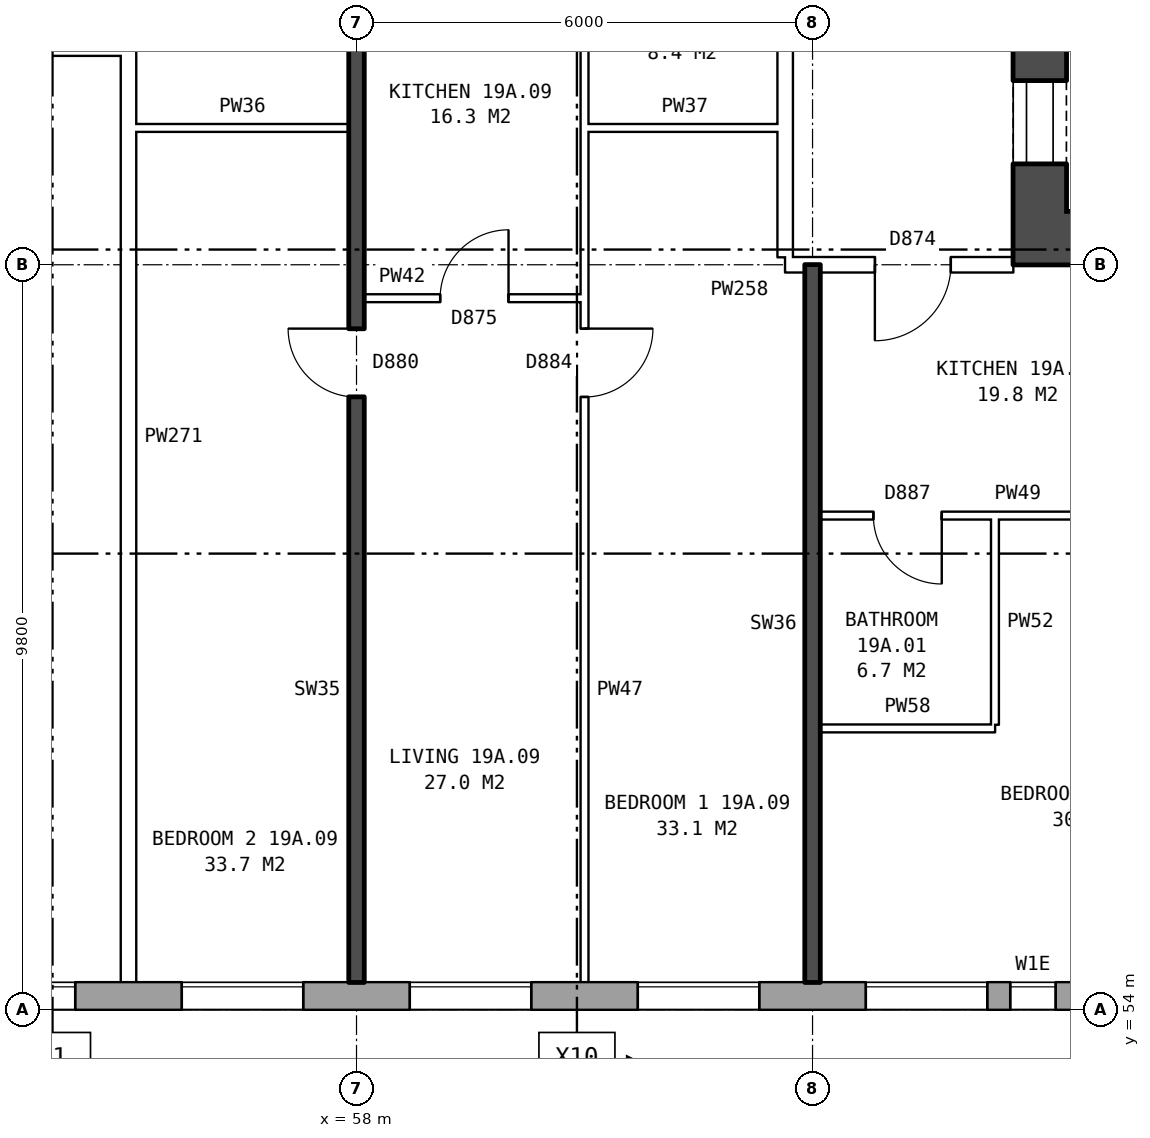
"""IFC4 building model, lengths in metres.
Left out: names, types, materials, properties, quantities, classifications, styles, units other than length and angle.
Written with IfcOpenShell. Run it as: python <this file> out.ifc"""

import sys

from ifc_helpers import new_model, si_unit, direction, frame, frame_2d, origin, place, context, subcontext, project, spatial, rectangle, extrude, element, fill, save


model = new_model("IFC4")
c1 = context("Model", 3, precision=1e-05, world=origin(), true_north=direction((0.0, 1.0)))
c2 = subcontext(c1, "Body", "Model", "MODEL_VIEW")
j1 = project(units=[si_unit("LENGTHUNIT", "METRE"), si_unit("PLANEANGLEUNIT", "RADIAN")], contexts=[c1])
p1 = place(None, origin())
s1 = spatial("IfcSite", under=j1, at=p1, CompositionType="ELEMENT")
p2 = place(p1, origin())
s2 = spatial("IfcBuilding", under=s1, at=p2, CompositionType="ELEMENT")
p3 = place(p2, frame((0.0, 0.0, 71.6)))
s3 = spatial("IfcBuildingStorey", under=s2, at=p3, CompositionType="ELEMENT", Elevation=71.6)
p4 = place(p3, frame((26.325, 54.18, 0.0), z_axis=(0.0, 0.0, 1.0), x_axis=(1.0, 0.0, 0.0)))
e1 = element("IfcWall", 1, at=p4, inside=s3, PredefinedType="STANDARD", context=c2, shape_type="SweptSolid", body=[
    extrude(rectangle(XDim=46.601, YDim=0.36, at=frame_2d((23.3, 0.0))), origin(), (0.0, 0.0, 1.0), 2.85),
])
p5 = place(p4, frame((1.875, 0.0, 1.0)))
e2 = element("IfcOpeningElement", 2, at=p5, cuts=e1, PredefinedType="OPENING", context=c2, shape_type="SweptSolid", body=[
    extrude(rectangle(XDim=0.6, YDim=1.5, at=frame_2d((0.3, 0.75))), frame((0.0, 0.19, 0.0), z_axis=(0.0, -1.0, 0.0), x_axis=(1.0, 0.0, 0.0)), (0.0, 0.0, 1.0), 0.38),
])
p6 = place(p4, frame((5.375, 0.0, 0.8)))
e3 = element("IfcOpeningElement", 3, at=p6, cuts=e1, PredefinedType="OPENING", context=c2, shape_type="SweptSolid", body=[
    extrude(rectangle(XDim=1.6, YDim=1.8, at=frame_2d((0.8, 0.9))), frame((0.0, 0.19, 0.0), z_axis=(0.0, -1.0, 0.0), x_axis=(1.0, 0.0, 0.0)), (0.0, 0.0, 1.0), 0.38),
])
p7 = place(p4, frame((8.375, 0.0, 0.8)))
e4 = element("IfcOpeningElement", 4, at=p7, cuts=e1, PredefinedType="OPENING", context=c2, shape_type="SweptSolid", body=[
    extrude(rectangle(XDim=1.6, YDim=1.8, at=frame_2d((0.8, 0.9))), frame((0.0, 0.19, 0.0), z_axis=(0.0, -1.0, 0.0), x_axis=(1.0, 0.0, 0.0)), (0.0, 0.0, 1.0), 0.38),
])
p8 = place(p4, frame((11.375, 0.0, 0.8)))
e5 = element("IfcOpeningElement", 5, at=p8, cuts=e1, PredefinedType="OPENING", context=c2, shape_type="SweptSolid", body=[
    extrude(rectangle(XDim=1.6, YDim=1.8, at=frame_2d((0.8, 0.9))), frame((0.0, 0.19, 0.0), z_axis=(0.0, -1.0, 0.0), x_axis=(1.0, 0.0, 0.0)), (0.0, 0.0, 1.0), 0.38),
])
p9 = place(p4, frame((14.375, 0.0, 0.8)))
e6 = element("IfcOpeningElement", 6, at=p9, cuts=e1, PredefinedType="OPENING", context=c2, shape_type="SweptSolid", body=[
    extrude(rectangle(XDim=1.6, YDim=1.8, at=frame_2d((0.8, 0.9))), frame((0.0, 0.19, 0.0), z_axis=(0.0, -1.0, 0.0), x_axis=(1.0, 0.0, 0.0)), (0.0, 0.0, 1.0), 0.38),
])
p10 = place(p4, frame((17.375, 0.0, 0.8)))
e7 = element("IfcOpeningElement", 7, at=p10, cuts=e1, PredefinedType="OPENING", context=c2, shape_type="SweptSolid", body=[
    extrude(rectangle(XDim=1.6, YDim=1.8, at=frame_2d((0.8, 0.9))), frame((0.0, 0.19, 0.0), z_axis=(0.0, -1.0, 0.0), x_axis=(1.0, 0.0, 0.0)), (0.0, 0.0, 1.0), 0.38),
])
p11 = place(p4, frame((20.375, 0.0, 0.8)))
e8 = element("IfcOpeningElement", 8, at=p11, cuts=e1, PredefinedType="OPENING", context=c2, shape_type="SweptSolid", body=[
    extrude(rectangle(XDim=1.6, YDim=1.8, at=frame_2d((0.8, 0.9))), frame((0.0, 0.19, 0.0), z_axis=(0.0, -1.0, 0.0), x_axis=(1.0, 0.0, 0.0)), (0.0, 0.0, 1.0), 0.38),
])
p12 = place(p4, frame((23.375, 0.0, 0.8)))
e9 = element("IfcOpeningElement", 9, at=p12, cuts=e1, PredefinedType="OPENING", context=c2, shape_type="SweptSolid", body=[
    extrude(rectangle(XDim=1.6, YDim=1.8, at=frame_2d((0.8, 0.9))), frame((0.0, 0.19, 0.0), z_axis=(0.0, -1.0, 0.0), x_axis=(1.0, 0.0, 0.0)), (0.0, 0.0, 1.0), 0.38),
])
p13 = place(p4, frame((26.375, 0.0, 0.8)))
e10 = element("IfcOpeningElement", 10, at=p13, cuts=e1, PredefinedType="OPENING", context=c2, shape_type="SweptSolid", body=[
    extrude(rectangle(XDim=1.6, YDim=1.8, at=frame_2d((0.8, 0.9))), frame((0.0, 0.19, 0.0), z_axis=(0.0, -1.0, 0.0), x_axis=(1.0, 0.0, 0.0)), (0.0, 0.0, 1.0), 0.38),
])
p14 = place(p4, frame((29.375, 0.0, 0.8)))
e11 = element("IfcOpeningElement", 11, at=p14, cuts=e1, PredefinedType="OPENING", context=c2, shape_type="SweptSolid", body=[
    extrude(rectangle(XDim=1.6, YDim=1.8, at=frame_2d((0.8, 0.9))), frame((0.0, 0.19, 0.0), z_axis=(0.0, -1.0, 0.0), x_axis=(1.0, 0.0, 0.0)), (0.0, 0.0, 1.0), 0.38),
])
p15 = place(p4, frame((32.375, 0.0, 0.8)))
e12 = element("IfcOpeningElement", 12, at=p15, cuts=e1, PredefinedType="OPENING", context=c2, shape_type="SweptSolid", body=[
    extrude(rectangle(XDim=1.6, YDim=1.8, at=frame_2d((0.8, 0.9))), frame((0.0, 0.19, 0.0), z_axis=(0.0, -1.0, 0.0), x_axis=(1.0, 0.0, 0.0)), (0.0, 0.0, 1.0), 0.38),
])
p16 = place(p4, frame((35.375, 0.0, 0.8)))
e13 = element("IfcOpeningElement", 13, at=p16, cuts=e1, PredefinedType="OPENING", context=c2, shape_type="SweptSolid", body=[
    extrude(rectangle(XDim=1.6, YDim=1.8, at=frame_2d((0.8, 0.9))), frame((0.0, 0.19, 0.0), z_axis=(0.0, -1.0, 0.0), x_axis=(1.0, 0.0, 0.0)), (0.0, 0.0, 1.0), 0.38),
])
p17 = place(p4, frame((38.375, 0.0, 0.8)))
e14 = element("IfcOpeningElement", 14, at=p17, cuts=e1, PredefinedType="OPENING", context=c2, shape_type="SweptSolid", body=[
    extrude(rectangle(XDim=1.6, YDim=1.8, at=frame_2d((0.8, 0.9))), frame((0.0, 0.19, 0.0), z_axis=(0.0, -1.0, 0.0), x_axis=(1.0, 0.0, 0.0)), (0.0, 0.0, 1.0), 0.38),
])
p18 = place(p4, frame((40.275, 0.0, 0.8)))
e15 = element("IfcOpeningElement", 15, at=p18, cuts=e1, PredefinedType="OPENING", context=c2, shape_type="SweptSolid", body=[
    extrude(rectangle(XDim=0.6, YDim=1.8, at=frame_2d((0.3, 0.9))), frame((0.0, 0.19, 0.0), z_axis=(0.0, -1.0, 0.0), x_axis=(1.0, 0.0, 0.0)), (0.0, 0.0, 1.0), 0.38),
])
p19 = place(p4, frame((44.375, 0.0, 0.8)))
e16 = element("IfcOpeningElement", 16, at=p19, cuts=e1, PredefinedType="OPENING", context=c2, shape_type="SweptSolid", body=[
    extrude(rectangle(XDim=1.6, YDim=1.8, at=frame_2d((0.8, 0.9))), frame((0.0, 0.19, 0.0), z_axis=(0.0, -1.0, 0.0), x_axis=(1.0, 0.0, 0.0)), (0.0, 0.0, 1.0), 0.38),
])
p20 = place(p4, frame((2.775, 0.0, 1.7)))
e17 = element("IfcOpeningElement", 17, at=p20, cuts=e1, PredefinedType="OPENING", context=c2, shape_type="SweptSolid", body=[
    extrude(rectangle(XDim=0.6, YDim=0.9, at=frame_2d((0.3, 0.45))), frame((0.0, 0.19, 0.0), z_axis=(0.0, -1.0, 0.0), x_axis=(1.0, 0.0, 0.0)), (0.0, 0.0, 1.0), 0.38),
])
p21 = place(p4, frame((41.175, 0.0, 0.8)))
e18 = element("IfcOpeningElement", 18, at=p21, cuts=e1, PredefinedType="OPENING", context=c2, shape_type="SweptSolid", body=[
    extrude(rectangle(XDim=0.8, YDim=0.9, at=frame_2d((0.4, 0.45))), frame((0.0, 0.19, 0.0), z_axis=(0.0, -1.0, 0.0), x_axis=(1.0, 0.0, 0.0)), (0.0, 0.0, 1.0), 0.38),
])
p22 = place(p3, frame((66.99, 64.5, 0.0), z_axis=(0.0, 0.0, 1.0), x_axis=(0.0, 1.0, 0.0)))
e19 = element("IfcWall", 19, at=p22, inside=s3, PredefinedType="SHEAR", context=c2, shape_type="SweptSolid", body=[
    extrude(rectangle(XDim=11.0, YDim=0.7, at=frame_2d((5.5, 0.0))), origin(), (0.0, 0.0, 1.0), 2.85),
])
p23 = place(p22, frame((0.625, 0.0, 0.0)))
e20 = element("IfcOpeningElement", 20, at=p23, cuts=e19, PredefinedType="OPENING", context=c2, shape_type="SweptSolid", body=[
    extrude(rectangle(XDim=1.1, YDim=2.1, at=frame_2d((0.55, 1.05))), frame((0.0, 0.36, 0.0), z_axis=(0.0, -1.0, 0.0), x_axis=(1.0, 0.0, 0.0)), (0.0, 0.0, 1.0), 0.72),
])
p24 = place(p22, frame((9.2, 0.0, 0.0)))
e21 = element("IfcOpeningElement", 21, at=p24, cuts=e19, PredefinedType="OPENING", context=c2, shape_type="SweptSolid", body=[
    extrude(rectangle(XDim=1.1, YDim=2.1, at=frame_2d((0.55, 1.05))), frame((0.0, 0.36, 0.0), z_axis=(0.0, -1.0, 0.0), x_axis=(1.0, 0.0, 0.0)), (0.0, 0.0, 1.0), 0.72),
])
p25 = place(p3, frame((66.64, 64.15, 0.0), z_axis=(0.0, 0.0, 1.0), x_axis=(1.0, 0.0, 0.0)))
e22 = element("IfcWall", 22, at=p25, inside=s3, PredefinedType="SHEAR", context=c2, shape_type="SweptSolid", body=[
    extrude(rectangle(XDim=9.0, YDim=0.7, at=frame_2d((4.5, 0.0))), origin(), (0.0, 0.0, 1.0), 2.85),
])
p26 = place(p3, frame((63.64, 63.9, 0.0), z_axis=(0.0, 0.0, 1.0), x_axis=(0.0, 1.0, 0.0)))
e23 = element("IfcWall", 23, at=p26, inside=s3, PredefinedType="PARTITIONING", context=c2, shape_type="SweptSolid", body=[
    extrude(rectangle(XDim=12.2, YDim=0.2, at=frame_2d((6.1, 0.0))), origin(), (0.0, 0.0, 1.0), 2.85),
])
p27 = place(p26, frame((5.1, 0.0, 0.0)))
e24 = element("IfcOpeningElement", 24, at=p27, cuts=e23, PredefinedType="OPENING", context=c2, shape_type="SweptSolid", body=[
    extrude(rectangle(XDim=2.0, YDim=2.1, at=frame_2d((1.0, 1.05))), frame((0.0, 0.11, 0.0), z_axis=(0.0, -1.0, 0.0), x_axis=(1.0, 0.0, 0.0)), (0.0, 0.0, 1.0), 0.22),
])
p28 = place(p3, frame((64.1, 57.7, 0.0), z_axis=(0.0, 0.0, 1.0), x_axis=(1.0, 0.0, 0.0)))
e25 = element("IfcWall", 25, at=p28, inside=s3, PredefinedType="PARTITIONING", context=c2, shape_type="SweptSolid", body=[
    extrude(rectangle(XDim=2.3, YDim=0.1, at=frame_2d((1.15, 0.0))), origin(), (0.0, 0.0, 1.0), 2.85),
])
p29 = place(p3, frame((64.1, 60.5, 0.0), z_axis=(0.0, 0.0, 1.0), x_axis=(1.0, 0.0, 0.0)))
e26 = element("IfcWall", 26, at=p29, inside=s3, PredefinedType="PARTITIONING", context=c2, shape_type="SweptSolid", body=[
    extrude(rectangle(XDim=5.8, YDim=0.1, at=frame_2d((2.9, 0.0))), origin(), (0.0, 0.0, 1.0), 2.85),
])
p30 = place(p29, frame((3.6, 0.0, 0.0)))
e27 = element("IfcOpeningElement", 27, at=p30, cuts=e26, PredefinedType="OPENING", context=c2, shape_type="SweptSolid", body=[
    extrude(rectangle(XDim=0.9, YDim=2.1, at=frame_2d((0.45, 1.05))), frame((0.0, 0.06, 0.0), z_axis=(0.0, -1.0, 0.0), x_axis=(1.0, 0.0, 0.0)), (0.0, 0.0, 1.0), 0.12),
])
p31 = place(p29, frame((0.7, 0.0, 0.0)))
e28 = element("IfcOpeningElement", 28, at=p31, cuts=e26, PredefinedType="OPENING", context=c2, shape_type="SweptSolid", body=[
    extrude(rectangle(XDim=0.9, YDim=2.1, at=frame_2d((0.45, 1.05))), frame((0.0, 0.06, 0.0), z_axis=(0.0, -1.0, 0.0), x_axis=(1.0, 0.0, 0.0)), (0.0, 0.0, 1.0), 0.12),
])
p32 = place(p3, frame((58.1, 63.36, 0.0), z_axis=(0.0, 0.0, 1.0), x_axis=(1.0, 0.0, 0.0)))
e29 = element("IfcWall", 29, at=p32, inside=s3, PredefinedType="PARTITIONING", context=c2, shape_type="SweptSolid", body=[
    extrude(rectangle(XDim=2.9, YDim=0.1, at=frame_2d((1.45, 0.0))), origin(), (0.0, 0.0, 1.0), 2.85),
])
p33 = place(p32, frame((1.0, 0.0, 0.0)))
e30 = element("IfcOpeningElement", 30, at=p33, cuts=e29, PredefinedType="OPENING", context=c2, shape_type="SweptSolid", body=[
    extrude(rectangle(XDim=0.9, YDim=2.1, at=frame_2d((0.45, 1.05))), frame((0.0, 0.06, 0.0), z_axis=(0.0, -1.0, 0.0), x_axis=(1.0, 0.0, 0.0)), (0.0, 0.0, 1.0), 0.12),
])
p34 = place(p3, frame((63.64, 63.8, 0.0), z_axis=(0.0, 0.0, 1.0), x_axis=(1.0, 0.0, 0.0)))
e31 = element("IfcWall", 31, at=p34, inside=s3, PredefinedType="PARTITIONING", context=c2, shape_type="SweptSolid", body=[
    extrude(rectangle(XDim=3.0, YDim=0.2, at=frame_2d((1.5, 0.0))), origin(), (0.0, 0.0, 1.0), 2.85),
])
p35 = place(p34, frame((1.18, 0.0, 0.0)))
e32 = element("IfcOpeningElement", 32, at=p35, cuts=e31, PredefinedType="OPENING", context=c2, shape_type="SweptSolid", body=[
    extrude(rectangle(XDim=1.0, YDim=2.1, at=frame_2d((0.5, 1.05))), frame((0.0, 0.11, 0.0), z_axis=(0.0, -1.0, 0.0), x_axis=(1.0, 0.0, 0.0)), (0.0, 0.0, 1.0), 0.22),
])
p36 = place(p3, frame((55.1, 65.6, 0.0), z_axis=(0.0, 0.0, 1.0), x_axis=(1.0, 0.0, 0.0)))
e33 = element("IfcWall", 33, at=p36, inside=s3, PredefinedType="PARTITIONING", context=c2, shape_type="SweptSolid", body=[
    extrude(rectangle(XDim=2.8, YDim=0.1, at=frame_2d((1.4, 0.0))), origin(), (0.0, 0.0, 1.0), 2.85),
])
p37 = place(p3, frame((61.0, 65.6, 0.0), z_axis=(0.0, 0.0, 1.0), x_axis=(1.0, 0.0, 0.0)))
e34 = element("IfcWall", 34, at=p37, inside=s3, PredefinedType="PARTITIONING", context=c2, shape_type="SweptSolid", body=[
    extrude(rectangle(XDim=2.64, YDim=0.1, at=frame_2d((1.32, 0.0))), origin(), (0.0, 0.0, 1.0), 2.85),
])
p38 = place(p3, frame((52.1, 66.6, 0.0), z_axis=(0.0, 0.0, 1.0), x_axis=(1.0, 0.0, 0.0)))
e35 = element("IfcWall", 35, at=p38, inside=s3, PredefinedType="PARTITIONING", context=c2, shape_type="SweptSolid", body=[
    extrude(rectangle(XDim=2.8, YDim=0.1, at=frame_2d((1.4, 0.0))), origin(), (0.0, 0.0, 1.0), 2.85),
])
p39 = place(p3, frame((55.0, 54.36, 0.0), z_axis=(0.0, 0.0, 1.0), x_axis=(0.0, 1.0, 0.0)))
e36 = element("IfcWall", 36, at=p39, inside=s3, PredefinedType="PARTITIONING", context=c2, shape_type="SweptSolid", body=[
    extrude(rectangle(XDim=14.34, YDim=0.2, at=frame_2d((7.17, 0.0))), origin(), (0.0, 0.0, 1.0), 2.85),
])
p40 = place(p3, frame((58.0, 54.36, 0.0), z_axis=(0.0, 0.0, 1.0), x_axis=(0.0, 1.0, 0.0)))
e37 = element("IfcWall", 37, at=p40, inside=s3, PredefinedType="SOLIDWALL", context=c2, shape_type="SweptSolid", body=[
    extrude(rectangle(XDim=14.44, YDim=0.2, at=frame_2d((7.22, 0.0))), origin(), (0.0, 0.0, 1.0), 2.85),
])
p41 = place(p40, frame((7.7, 0.0, 0.0)))
e38 = element("IfcOpeningElement", 38, at=p41, cuts=e37, PredefinedType="OPENING", context=c2, shape_type="SweptSolid", body=[
    extrude(rectangle(XDim=0.9, YDim=2.1, at=frame_2d((0.45, 1.05))), frame((0.0, 0.11, 0.0), z_axis=(0.0, -1.0, 0.0), x_axis=(1.0, 0.0, 0.0)), (0.0, 0.0, 1.0), 0.22),
])
p42 = place(p40, frame((13.14, 0.0, 0.0)))
e39 = element("IfcOpeningElement", 39, at=p42, cuts=e37, PredefinedType="OPENING", context=c2, shape_type="SweptSolid", body=[
    extrude(rectangle(XDim=0.9, YDim=2.1, at=frame_2d((0.45, 1.05))), frame((0.0, 0.11, 0.0), z_axis=(0.0, -1.0, 0.0), x_axis=(1.0, 0.0, 0.0)), (0.0, 0.0, 1.0), 0.22),
])
p43 = place(p3, frame((61.0, 54.36, 0.0), z_axis=(0.0, 0.0, 1.0), x_axis=(0.0, 1.0, 0.0)))
e40 = element("IfcWall", 40, at=p43, inside=s3, PredefinedType="PARTITIONING", context=c2, shape_type="SweptSolid", body=[
    extrude(rectangle(XDim=14.34, YDim=0.1, at=frame_2d((7.17, 0.0))), origin(), (0.0, 0.0, 1.0), 2.85),
])
p44 = place(p43, frame((7.7, 0.0, 0.0)))
e41 = element("IfcOpeningElement", 41, at=p44, cuts=e40, PredefinedType="OPENING", context=c2, shape_type="SweptSolid", body=[
    extrude(rectangle(XDim=0.9, YDim=2.1, at=frame_2d((0.45, 1.05))), frame((0.0, 0.06, 0.0), z_axis=(0.0, -1.0, 0.0), x_axis=(1.0, 0.0, 0.0)), (0.0, 0.0, 1.0), 0.12),
])
p45 = place(p43, frame((13.04, 0.0, 0.0)))
e42 = element("IfcOpeningElement", 42, at=p45, cuts=e40, PredefinedType="OPENING", context=c2, shape_type="SweptSolid", body=[
    extrude(rectangle(XDim=0.9, YDim=2.1, at=frame_2d((0.45, 1.05))), frame((0.0, 0.06, 0.0), z_axis=(0.0, -1.0, 0.0), x_axis=(1.0, 0.0, 0.0)), (0.0, 0.0, 1.0), 0.12),
])
p46 = place(p3, frame((64.0, 54.36, 0.0), z_axis=(0.0, 0.0, 1.0), x_axis=(0.0, 1.0, 0.0)))
e43 = element("IfcWall", 43, at=p46, inside=s3, PredefinedType="SOLIDWALL", context=c2, shape_type="SweptSolid", body=[
    extrude(rectangle(XDim=9.44, YDim=0.2, at=frame_2d((4.72, 0.0))), origin(), (0.0, 0.0, 1.0), 2.85),
])
p47 = place(p3, frame((66.4, 57.75, 0.0), z_axis=(0.0, 0.0, 1.0), x_axis=(0.0, 1.0, 0.0)))
e44 = element("IfcWall", 44, at=p47, inside=s3, PredefinedType="PARTITIONING", context=c2, shape_type="SweptSolid", body=[
    extrude(rectangle(XDim=2.7, YDim=0.1, at=frame_2d((1.35, 0.0))), origin(), (0.0, 0.0, 1.0), 2.85),
])
p48 = place(p13, origin())
e45 = element("IfcWindow", 45, at=p48, inside=s3, PartitioningType="SINGLE_PANEL", PredefinedType="WINDOW", context=c2, shape_type="SweptSolid", body=[
    extrude(rectangle(XDim=1.6, YDim=1.8, at=frame_2d((0.8, 0.9))), frame((0.0, 0.15, 0.0), z_axis=(0.0, -1.0, 0.0), x_axis=(1.0, 0.0, 0.0)), (0.0, 0.0, 1.0), 0.06),
])
fill(e10, e45)
p49 = place(p14, origin())
e46 = element("IfcWindow", 46, at=p49, inside=s3, PartitioningType="SINGLE_PANEL", PredefinedType="WINDOW", context=c2, shape_type="SweptSolid", body=[
    extrude(rectangle(XDim=1.6, YDim=1.8, at=frame_2d((0.8, 0.9))), frame((0.0, 0.15, 0.0), z_axis=(0.0, -1.0, 0.0), x_axis=(1.0, 0.0, 0.0)), (0.0, 0.0, 1.0), 0.06),
])
fill(e11, e46)
p50 = place(p15, origin())
e47 = element("IfcWindow", 47, at=p50, inside=s3, PartitioningType="SINGLE_PANEL", PredefinedType="WINDOW", context=c2, shape_type="SweptSolid", body=[
    extrude(rectangle(XDim=1.6, YDim=1.8, at=frame_2d((0.8, 0.9))), frame((0.0, 0.15, 0.0), z_axis=(0.0, -1.0, 0.0), x_axis=(1.0, 0.0, 0.0)), (0.0, 0.0, 1.0), 0.06),
])
fill(e12, e47)
p51 = place(p16, origin())
e48 = element("IfcWindow", 48, at=p51, inside=s3, PartitioningType="SINGLE_PANEL", PredefinedType="WINDOW", context=c2, shape_type="SweptSolid", body=[
    extrude(rectangle(XDim=1.6, YDim=1.8, at=frame_2d((0.8, 0.9))), frame((0.0, 0.15, 0.0), z_axis=(0.0, -1.0, 0.0), x_axis=(1.0, 0.0, 0.0)), (0.0, 0.0, 1.0), 0.06),
])
fill(e13, e48)
p52 = place(p17, origin())
e49 = element("IfcWindow", 49, at=p52, inside=s3, PartitioningType="SINGLE_PANEL", PredefinedType="WINDOW", context=c2, shape_type="SweptSolid", body=[
    extrude(rectangle(XDim=1.6, YDim=1.8, at=frame_2d((0.8, 0.9))), frame((0.0, 0.15, 0.0), z_axis=(0.0, -1.0, 0.0), x_axis=(1.0, 0.0, 0.0)), (0.0, 0.0, 1.0), 0.06),
])
fill(e14, e49)
p53 = place(p18, origin())
e50 = element("IfcWindow", 50, at=p53, inside=s3, PartitioningType="SINGLE_PANEL", PredefinedType="WINDOW", context=c2, shape_type="SweptSolid", body=[
    extrude(rectangle(XDim=0.6, YDim=1.8, at=frame_2d((0.3, 0.9))), frame((0.0, 0.15, 0.0), z_axis=(0.0, -1.0, 0.0), x_axis=(1.0, 0.0, 0.0)), (0.0, 0.0, 1.0), 0.06),
])
fill(e15, e50)
p54 = place(p23, origin())
e51 = element("IfcDoor", 51, at=p54, inside=s3, OperationType="DOUBLE_DOOR_SLIDING", PredefinedType="DOOR", context=c2, shape_type="SweptSolid", body=[
    extrude(rectangle(XDim=1.1, YDim=2.1, at=frame_2d((0.55, 1.05))), frame((0.0, -0.285, 0.0), z_axis=(0.0, -1.0, 0.0), x_axis=(1.0, 0.0, 0.0)), (0.0, 0.0, 1.0), 0.05),
])
fill(e20, e51)
p55 = place(p35, frame((1.0, 0.0, 0.0), z_axis=(0.0, 0.0, 1.0), x_axis=(-1.0, 0.0, 0.0)))
e52 = element("IfcDoor", 52, at=p55, inside=s3, OperationType="SINGLE_SWING_RIGHT", PredefinedType="DOOR", context=c2, shape_type="SweptSolid", body=[
    extrude(rectangle(XDim=1.0, YDim=2.1, at=frame_2d((0.5, 1.05))), frame((0.0, 0.025, 0.0), z_axis=(0.0, -1.0, 0.0), x_axis=(1.0, 0.0, 0.0)), (0.0, 0.0, 1.0), 0.05),
])
fill(e32, e52)
p56 = place(p31, frame((0.9, 0.0, 0.0), z_axis=(0.0, 0.0, 1.0), x_axis=(-1.0, 0.0, 0.0)))
e53 = element("IfcDoor", 53, at=p56, inside=s3, OperationType="SINGLE_SWING_LEFT", PredefinedType="DOOR", context=c2, shape_type="SweptSolid", body=[
    extrude(rectangle(XDim=0.9, YDim=2.1, at=frame_2d((0.45, 1.05))), frame((0.0, 0.025, 0.0), z_axis=(0.0, -1.0, 0.0), x_axis=(1.0, 0.0, 0.0)), (0.0, 0.0, 1.0), 0.05),
])
fill(e28, e53)
p57 = place(p44, frame((0.9, 0.0, 0.0), z_axis=(0.0, 0.0, 1.0), x_axis=(-1.0, 0.0, 0.0)))
e54 = element("IfcDoor", 54, at=p57, inside=s3, OperationType="SINGLE_SWING_LEFT", PredefinedType="DOOR", context=c2, shape_type="SweptSolid", body=[
    extrude(rectangle(XDim=0.9, YDim=2.1, at=frame_2d((0.45, 1.05))), frame((0.0, 0.025, 0.0), z_axis=(0.0, -1.0, 0.0), x_axis=(1.0, 0.0, 0.0)), (0.0, 0.0, 1.0), 0.05),
])
fill(e41, e54)
p58 = place(p41, origin())
e55 = element("IfcDoor", 55, at=p58, inside=s3, OperationType="SINGLE_SWING_RIGHT", PredefinedType="DOOR", context=c2, shape_type="SweptSolid", body=[
    extrude(rectangle(XDim=0.9, YDim=2.1, at=frame_2d((0.45, 1.05))), frame((0.0, 0.025, 0.0), z_axis=(0.0, -1.0, 0.0), x_axis=(1.0, 0.0, 0.0)), (0.0, 0.0, 1.0), 0.05),
])
fill(e38, e55)
p59 = place(p33, origin())
e56 = element("IfcDoor", 56, at=p59, inside=s3, OperationType="SINGLE_SWING_RIGHT", PredefinedType="DOOR", context=c2, shape_type="SweptSolid", body=[
    extrude(rectangle(XDim=0.9, YDim=2.1, at=frame_2d((0.45, 1.05))), frame((0.0, 0.025, 0.0), z_axis=(0.0, -1.0, 0.0), x_axis=(1.0, 0.0, 0.0)), (0.0, 0.0, 1.0), 0.05),
])
fill(e30, e56)
save(model, sys.argv[1])
